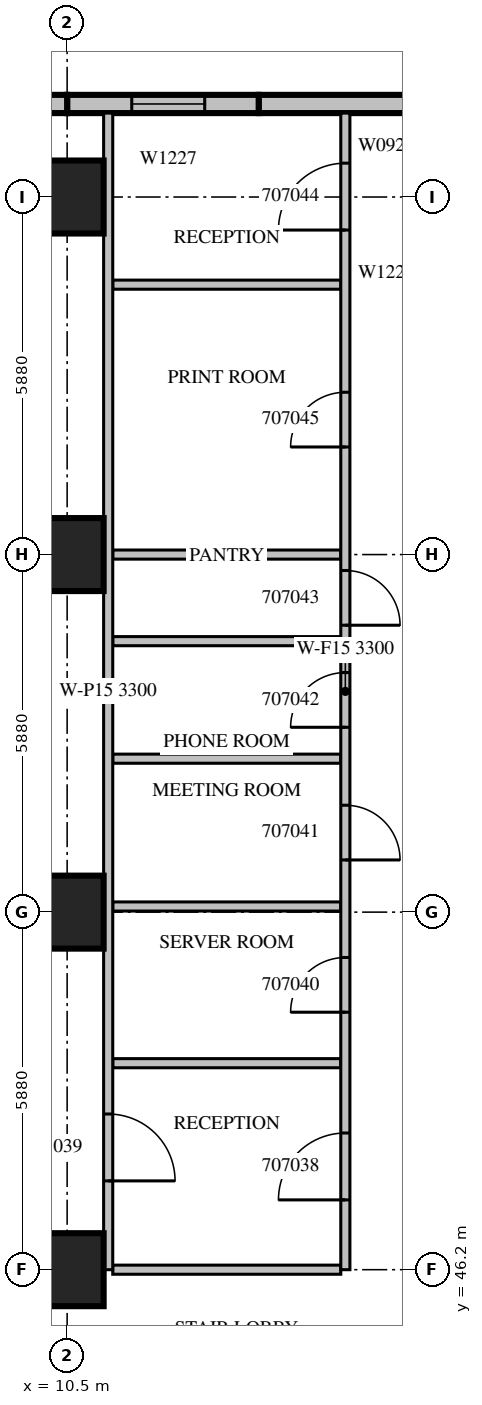
"""IFC4 building model, lengths in metres.
Left out: names, types, materials, properties, quantities, classifications, styles, units other than length and angle.
Written with IfcOpenShell. Run it as: python <this file> out.ifc"""

import sys

from ifc_helpers import new_model, si_unit, direction, frame, frame_2d, origin, origin_2d, place, context, subcontext, project, spatial, rectangle, extrude, source, transform, mapped, element, fill, save


model = new_model("IFC4")
c1 = context("Model", 3, precision=1e-05, world=origin(), true_north=direction((0.0, 1.0)))
c2 = subcontext(c1, "Body", "Model", "MODEL_VIEW")
j1 = project(units=[si_unit("LENGTHUNIT", "METRE"), si_unit("PLANEANGLEUNIT", "RADIAN")], contexts=[c1])
p1 = place(None, origin())
s1 = spatial("IfcSite", under=j1, at=p1, CompositionType="ELEMENT")
p2 = place(p1, origin())
s2 = spatial("IfcBuilding", under=s1, at=p2, CompositionType="ELEMENT")
p3 = place(p2, frame((0.0, 0.0, 40.5)))
s3 = spatial("IfcBuildingStorey", under=s2, at=p3, CompositionType="ELEMENT", Elevation=40.5)
m1 = source(origin(), c2, "Body", "SweptSolid", [
    extrude(rectangle(XDim=1.2, YDim=1.2, at=origin_2d()), origin(), (0.0, 0.0, 1.0), 4.2),
])
for number, where, z_axis, x_axis in (
    (1, (10.5, 46.2, 0.0), (0.0, 0.0, 1.0), (1.0, 0.0, 0.0)),
    (2, (10.5, 52.08, 0.0), (0.0, 0.0, 1.0), (1.0, 0.0, 0.0)),
    (3, (10.5, 57.96, 0.0), (0.0, 0.0, 1.0), (1.0, 0.0, 0.0)),
    (4, (10.5, 63.84, 0.0), (0.0, 0.0, 1.0), (1.0, 0.0, 0.0)),
):
    element("IfcColumn", number, at=place(p3, frame(where, z_axis=z_axis, x_axis=x_axis)), inside=s3, PredefinedType="COLUMN", context=c2, shape_type="MappedRepresentation", body=[
        mapped(m1, transform((0.0, 0.0, 0.0), scale=1.0)),
    ])
m2 = source(origin(), c2, "Body", "SweptSolid", [
    extrude(rectangle(XDim=3.15, YDim=0.3, at=frame_2d((1.575, 0.0))), origin(), (0.0, 0.0, 1.0), 3.8),
])
p4 = place(p3, frame((16.8, 65.37, 0.0), z_axis=(0.0, 0.0, 1.0), x_axis=(-1.0, 0.0, 0.0)))
e5 = element("IfcWall", 5, at=p4, inside=s3, PredefinedType="STANDARD", context=c2, shape_type="MappedRepresentation", body=[
    mapped(m2, transform((0.0, 0.0, 0.0), scale=1.0)),
])
p5 = place(p3, frame((13.65, 65.37, 0.0), z_axis=(0.0, 0.0, 1.0), x_axis=(-1.0, 0.0, 0.0)))
e6 = element("IfcWall", 6, at=p5, inside=s3, PredefinedType="STANDARD", context=c2, shape_type="MappedRepresentation", body=[
    mapped(m2, transform((0.0, 0.0, 0.0), scale=1.0)),
])
m3 = source(origin(), c2, "Body", "SweptSolid", [
    extrude(rectangle(XDim=1.2, YDim=2.7, at=frame_2d((0.6, 1.35))), frame((0.0, 0.16, 0.0), z_axis=(0.0, -1.0, 0.0), x_axis=(1.0, 0.0, 0.0)), (0.0, 0.0, 1.0), 0.32),
])
p6 = place(p5, frame((0.887, 0.0, 0.6)))
e7 = element("IfcOpeningElement", 7, at=p6, cuts=e6, PredefinedType="OPENING", context=c2, shape_type="MappedRepresentation", body=[
    mapped(m3, transform((0.0, 0.0, 0.0), scale=1.0)),
])
m4 = source(origin(), c2, "Body", "SweptSolid", [
    extrude(rectangle(XDim=6.3, YDim=0.3, at=frame_2d((3.15, 0.0))), origin(), (0.0, 0.0, 1.0), 3.8),
])
p7 = place(p3, frame((10.5, 65.37, 0.0), z_axis=(0.0, 0.0, 1.0), x_axis=(-1.0, 0.0, 0.0)))
e8 = element("IfcWall", 8, at=p7, inside=s3, PredefinedType="STANDARD", context=c2, shape_type="MappedRepresentation", body=[
    mapped(m4, transform((0.0, 0.0, 0.0), scale=1.0)),
])
m5 = source(origin(), c2, "Body", "SweptSolid", [
    extrude(rectangle(XDim=1.8, YDim=2.7, at=frame_2d((0.9, 1.35))), frame((0.0, 0.16, 0.0), z_axis=(0.0, -1.0, 0.0), x_axis=(1.0, 0.0, 0.0)), (0.0, 0.0, 1.0), 0.32),
])
p8 = place(p7, frame((0.675, 0.0, 0.6)))
e9 = element("IfcOpeningElement", 9, at=p8, cuts=e8, PredefinedType="OPENING", context=c2, shape_type="MappedRepresentation", body=[
    mapped(m5, transform((0.0, 0.0, 0.0), scale=1.0)),
])
p9 = place(p7, frame((3.825, 0.0, 0.6)))
e10 = element("IfcOpeningElement", 10, at=p9, cuts=e8, PredefinedType="OPENING", context=c2, shape_type="MappedRepresentation", body=[
    mapped(m5, transform((0.0, 0.0, 0.0), scale=1.0)),
])
m6 = source(origin(), c2, "Body", "SweptSolid", [
    extrude(rectangle(XDim=3.75, YDim=0.15, at=frame_2d((1.875, 0.0))), origin(), (0.0, 0.0, 1.0), 3.8),
])
for number, where, z_axis, x_axis in (
    (11, (15.0, 49.596, 0.0), (0.0, 0.0, 1.0), (-1.0, 0.0, 0.0)),
    (12, (15.0, 52.173, 0.0), (0.0, 0.0, 1.0), (-1.0, 0.0, 0.0)),
    (13, (15.0, 54.603, 0.0), (0.0, 0.0, 1.0), (-1.0, 0.0, 0.0)),
    (14, (15.0, 56.536, 0.0), (0.0, 0.0, 1.0), (-1.0, 0.0, 0.0)),
    (15, (15.0, 62.399, 0.0), (0.0, 0.0, 1.0), (-1.0, 0.0, 0.0)),
    (16, (15.0, 46.2, 0.0), (0.0, 0.0, 1.0), (-1.0, 0.0, 0.0)),
    (17, (15.0, 57.96, 0.0), (0.0, 0.0, 1.0), (-1.0, 0.0, 0.0)),
):
    element("IfcWall", number, at=place(p3, frame(where, z_axis=z_axis, x_axis=x_axis)), inside=s3, PredefinedType="PARTITIONING", context=c2, shape_type="MappedRepresentation", body=[
        mapped(m6, transform((0.0, 0.0, 0.0), scale=1.0)),
    ])
p10 = place(p3, frame((11.175, 46.2, 0.0), z_axis=(0.0, 0.0, 1.0), x_axis=(0.0, 1.0, 0.0)))
e18 = element("IfcWall", 18, at=p10, inside=s3, PredefinedType="PARTITIONING", context=c2, shape_type="SweptSolid", body=[
    extrude(rectangle(XDim=19.02, YDim=0.15, at=frame_2d((9.51, 0.0))), origin(), (0.0, 0.0, 1.0), 3.3),
])
m7 = source(origin(), c2, "Body", "SweptSolid", [
    extrude(rectangle(XDim=1.1, YDim=2.1, at=frame_2d((0.55, 1.05))), frame((0.0, 0.085, 0.0), z_axis=(0.0, -1.0, 0.0), x_axis=(1.0, 0.0, 0.0)), (0.0, 0.0, 1.0), 0.17),
])
p11 = place(p10, frame((1.46, 0.0, 0.0)))
e19 = element("IfcOpeningElement", 19, at=p11, cuts=e18, PredefinedType="OPENING", context=c2, shape_type="MappedRepresentation", body=[
    mapped(m7, transform((0.0, 0.0, 0.0), scale=1.0)),
])
m8 = source(origin(), c2, "Body", "SweptSolid", [
    extrude(rectangle(XDim=19.02, YDim=0.15, at=frame_2d((9.51, 0.0))), origin(), (0.0, 0.0, 1.0), 3.3),
])
p12 = place(p3, frame((15.075, 46.2, 0.0), z_axis=(0.0, 0.0, 1.0), x_axis=(0.0, 1.0, 0.0)))
e20 = element("IfcWall", 20, at=p12, inside=s3, PredefinedType="PARTITIONING", context=c2, shape_type="MappedRepresentation", body=[
    mapped(m8, transform((0.0, 0.0, 0.0), scale=1.0)),
])
p13 = place(p12, frame((1.148, 0.0, 0.0)))
e21 = element("IfcOpeningElement", 21, at=p13, cuts=e20, PredefinedType="OPENING", context=c2, shape_type="MappedRepresentation", body=[
    mapped(m7, transform((0.0, 0.0, 0.0), scale=1.0)),
])
m9 = source(origin(), c2, "Body", "SweptSolid", [
    extrude(rectangle(XDim=0.9, YDim=2.1, at=frame_2d((0.45, 1.05))), frame((0.0, 0.085, 0.0), z_axis=(0.0, -1.0, 0.0), x_axis=(1.0, 0.0, 0.0)), (0.0, 0.0, 1.0), 0.17),
])
p14 = place(p12, frame((4.234, 0.0, 0.0)))
e22 = element("IfcOpeningElement", 22, at=p14, cuts=e20, PredefinedType="OPENING", context=c2, shape_type="MappedRepresentation", body=[
    mapped(m9, transform((0.0, 0.0, 0.0), scale=1.0)),
])
p15 = place(p12, frame((6.738, 0.0, 0.0)))
e23 = element("IfcOpeningElement", 23, at=p15, cuts=e20, PredefinedType="OPENING", context=c2, shape_type="MappedRepresentation", body=[
    mapped(m9, transform((0.0, 0.0, 0.0), scale=1.0)),
])
p16 = place(p12, frame((8.92, 0.0, 0.0)))
e24 = element("IfcOpeningElement", 24, at=p16, cuts=e20, PredefinedType="OPENING", context=c2, shape_type="MappedRepresentation", body=[
    mapped(m9, transform((0.0, 0.0, 0.0), scale=1.0)),
])
p17 = place(p12, frame((10.598, 0.0, 0.0)))
e25 = element("IfcOpeningElement", 25, at=p17, cuts=e20, PredefinedType="OPENING", context=c2, shape_type="MappedRepresentation", body=[
    mapped(m9, transform((0.0, 0.0, 0.0), scale=1.0)),
])
p18 = place(p12, frame((17.097, 0.0, 0.0)))
e26 = element("IfcOpeningElement", 26, at=p18, cuts=e20, PredefinedType="OPENING", context=c2, shape_type="MappedRepresentation", body=[
    mapped(m7, transform((0.0, 0.0, 0.0), scale=1.0)),
])
p19 = place(p12, frame((13.529, 0.0, 0.0)))
e27 = element("IfcOpeningElement", 27, at=p19, cuts=e20, PredefinedType="OPENING", context=c2, shape_type="MappedRepresentation", body=[
    mapped(m9, transform((0.0, 0.0, 0.0), scale=1.0)),
])
m10 = source(origin(), c2, "Body", "SweptSolid", [
    extrude(rectangle(XDim=1.2, YDim=2.7, at=frame_2d((0.6, 1.35))), frame((0.0, 0.03, 0.0), z_axis=(0.0, -1.0, 0.0), x_axis=(1.0, 0.0, 0.0)), (0.0, 0.0, 1.0), 0.06),
])
p20 = place(p6, origin())
e28 = element("IfcWindow", 28, at=p20, inside=s3, PartitioningType="SINGLE_PANEL", PredefinedType="WINDOW", context=c2, shape_type="MappedRepresentation", body=[
    mapped(m10, transform((0.0, 0.0, 0.0), scale=1.0)),
])
fill(e7, e28)
m11 = source(origin(), c2, "Body", "SweptSolid", [
    extrude(rectangle(XDim=1.1, YDim=2.1, at=frame_2d((0.55, 1.05))), frame((0.0, 0.025, 0.0), z_axis=(0.0, -1.0, 0.0), x_axis=(1.0, 0.0, 0.0)), (0.0, 0.0, 1.0), 0.05),
])
p21 = place(p13, origin())
e29 = element("IfcDoor", 29, at=p21, inside=s3, OperationType="SINGLE_SWING_LEFT", PredefinedType="DOOR", context=c2, shape_type="MappedRepresentation", body=[
    mapped(m11, transform((0.0, 0.0, 0.0), scale=1.0)),
])
fill(e21, e29)
p22 = place(p11, origin())
e30 = element("IfcDoor", 30, at=p22, inside=s3, OperationType="SINGLE_SWING_RIGHT", PredefinedType="DOOR", context=c2, shape_type="MappedRepresentation", body=[
    mapped(m11, transform((0.0, 0.0, 0.0), scale=1.0)),
])
fill(e19, e30)
m12 = source(origin(), c2, "Body", "SweptSolid", [
    extrude(rectangle(XDim=0.9, YDim=2.1, at=frame_2d((0.45, 1.05))), frame((0.0, 0.025, 0.0), z_axis=(0.0, -1.0, 0.0), x_axis=(1.0, 0.0, 0.0)), (0.0, 0.0, 1.0), 0.05),
])
p23 = place(p14, origin())
e31 = element("IfcDoor", 31, at=p23, inside=s3, OperationType="SINGLE_SWING_LEFT", PredefinedType="DOOR", context=c2, shape_type="MappedRepresentation", body=[
    mapped(m12, transform((0.0, 0.0, 0.0), scale=1.0)),
])
fill(e22, e31)
p24 = place(p15, origin())
e32 = element("IfcDoor", 32, at=p24, inside=s3, OperationType="SINGLE_SWING_RIGHT", PredefinedType="DOOR", context=c2, shape_type="MappedRepresentation", body=[
    mapped(m12, transform((0.0, 0.0, 0.0), scale=1.0)),
])
fill(e23, e32)
p25 = place(p16, origin())
e33 = element("IfcDoor", 33, at=p25, inside=s3, OperationType="SINGLE_SWING_LEFT", PredefinedType="DOOR", context=c2, shape_type="MappedRepresentation", body=[
    mapped(m12, transform((0.0, 0.0, 0.0), scale=1.0)),
])
fill(e24, e33)
p26 = place(p17, origin())
e34 = element("IfcDoor", 34, at=p26, inside=s3, OperationType="SINGLE_SWING_RIGHT", PredefinedType="DOOR", context=c2, shape_type="MappedRepresentation", body=[
    mapped(m12, transform((0.0, 0.0, 0.0), scale=1.0)),
])
fill(e25, e34)
p27 = place(p18, origin())
e35 = element("IfcDoor", 35, at=p27, inside=s3, OperationType="SINGLE_SWING_LEFT", PredefinedType="DOOR", context=c2, shape_type="MappedRepresentation", body=[
    mapped(m11, transform((0.0, 0.0, 0.0), scale=1.0)),
])
fill(e26, e35)
p28 = place(p19, origin())
e36 = element("IfcDoor", 36, at=p28, inside=s3, OperationType="SINGLE_SWING_LEFT", PredefinedType="DOOR", context=c2, shape_type="MappedRepresentation", body=[
    mapped(m12, transform((0.0, 0.0, 0.0), scale=1.0)),
])
fill(e27, e36)
save(model, sys.argv[1])
